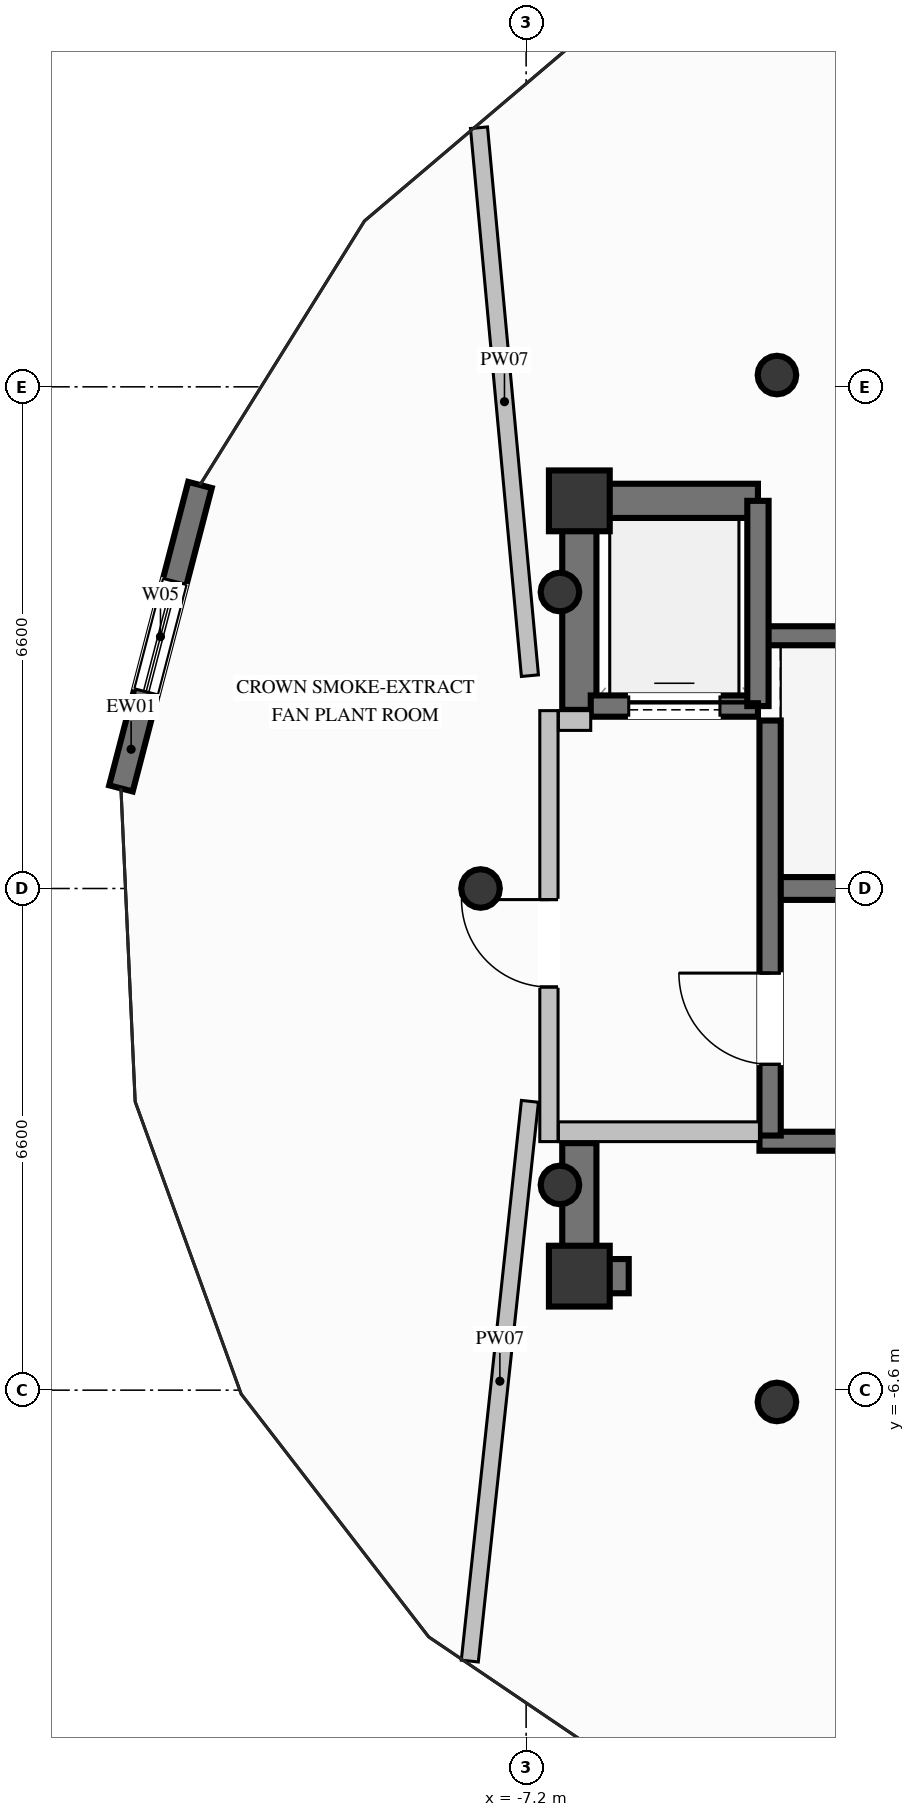
"""IFC4 building model, lengths in metres.
Left out: names, types, materials, properties, quantities, classifications, styles, units other than length and angle.
Written with IfcOpenShell. Run it as: python <this file> out.ifc"""

import sys

from ifc_helpers import new_model, si_unit, direction, frame, frame_2d, origin, origin_2d, place, context, subcontext, project, spatial, rectangle, hollow_circle, extrude, element, fill, save


model = new_model("IFC4")
c1 = context("Model", 3, precision=1e-05, world=origin(), true_north=direction((0.0, 1.0)))
c2 = subcontext(c1, "Body", "Model", "MODEL_VIEW")
j1 = project(units=[si_unit("LENGTHUNIT", "METRE"), si_unit("PLANEANGLEUNIT", "RADIAN")], contexts=[c1])
p1 = place(None, origin())
s1 = spatial("IfcSite", under=j1, at=p1, CompositionType="ELEMENT")
p2 = place(p1, origin())
s2 = spatial("IfcBuilding", under=s1, at=p2, CompositionType="ELEMENT")
p3 = place(p2, frame((0.0, 0.0, 308.2)))
s3 = spatial("IfcBuildingStorey", under=s2, at=p3, CompositionType="ELEMENT", Elevation=308.2)
for number, where, z_axis, x_axis in (
    (1, (-6.5, -5.1, 0.0), (0.0, 0.0, 1.0), (1.0, 0.0, 0.0)),
    (2, (-6.5, 5.1, 0.0), (0.0, 0.0, 1.0), (1.0, 0.0, 0.0)),
):
    element("IfcColumn", number, at=place(p3, frame(where, z_axis=z_axis, x_axis=x_axis)), inside=s3, PredefinedType="COLUMN", context=c2, shape_type="SweptSolid", body=[
        extrude(rectangle(XDim=0.8, YDim=0.8, at=origin_2d()), origin(), (0.0, 0.0, 1.0), 6.4),
    ])
p4 = place(p3, frame((-3.99, 0.0, 0.0), z_axis=(0.0, 0.0, 1.0), x_axis=(1.0, 0.0, 0.0)))
e3 = element("IfcWall", 3, at=p4, inside=s3, PredefinedType="SHEAR", context=c2, shape_type="SweptSolid", body=[
    extrude(rectangle(XDim=7.98, YDim=0.3, at=frame_2d((3.99, 0.0))), origin(), (0.0, 0.0, 1.0), 6.4),
])
for number, where, z_axis, x_axis in (
    (4, (-4.13, -3.325, 0.0), (0.0, 0.0, 1.0), (1.0, 0.0, 0.0)),
    (5, (-4.13, 3.325, 0.0), (0.0, 0.0, 1.0), (1.0, 0.0, 0.0)),
):
    element("IfcWall", number, at=place(p3, frame(where, z_axis=z_axis, x_axis=x_axis)), inside=s3, PredefinedType="SOLIDWALL", context=c2, shape_type="SweptSolid", body=[
        extrude(rectangle(XDim=8.26, YDim=0.25, at=frame_2d((4.13, 0.0))), origin(), (0.0, 0.0, 1.0), 6.4),
    ])
p5 = place(p3, frame((-6.275, -5.1, 0.0), z_axis=(0.0, 0.0, 1.0), x_axis=(1.0, 0.0, 0.0)))
e6 = element("IfcWall", 6, at=p5, inside=s3, PredefinedType="SHEAR", context=c2, shape_type="SweptSolid", body=[
    extrude(rectangle(XDim=0.425, YDim=0.45, at=frame_2d((0.212, 0.0))), origin(), (0.0, 0.0, 1.0), 6.4),
])
p6 = place(p3, frame((-6.275, 5.1, 0.0), z_axis=(0.0, 0.0, 1.0), x_axis=(1.0, 0.0, 0.0)))
e7 = element("IfcWall", 7, at=p6, inside=s3, PredefinedType="SHEAR", context=c2, shape_type="SweptSolid", body=[
    extrude(rectangle(XDim=2.125, YDim=0.45, at=frame_2d((1.062, 0.0))), origin(), (0.0, 0.0, 1.0), 6.4),
])
p7 = place(p3, frame((-6.5, 2.35, 0.0), z_axis=(0.0, 0.0, 1.0), x_axis=(0.0, 1.0, 0.0)))
e8 = element("IfcWall", 8, at=p7, inside=s3, PredefinedType="SHEAR", context=c2, shape_type="SweptSolid", body=[
    extrude(rectangle(XDim=2.975, YDim=0.45, at=frame_2d((1.487, 0.0))), origin(), (0.0, 0.0, 1.0), 6.4),
])
p8 = place(p3, frame((-6.5, -5.325, 0.0), z_axis=(0.0, 0.0, 1.0), x_axis=(0.0, 1.0, 0.0)))
e9 = element("IfcWall", 9, at=p8, inside=s3, PredefinedType="SHEAR", context=c2, shape_type="SweptSolid", body=[
    extrude(rectangle(XDim=1.975, YDim=0.45, at=frame_2d((0.987, 0.0))), origin(), (0.0, 0.0, 1.0), 6.4),
])
for number, where, z_axis, x_axis in (
    (10, (-3.9, 6.755, 0.0), (0.0, 0.0, 1.0), (1.0, 0.0, 0.0)),
    (11, (-6.755, 3.9, 0.0), (0.0, 0.0, 1.0), (1.0, 0.0, 0.0)),
    (12, (-7.8, 0.0, 0.0), (0.0, 0.0, 1.0), (1.0, 0.0, 0.0)),
    (13, (-6.755, -3.9, 0.0), (0.0, 0.0, 1.0), (1.0, 0.0, 0.0)),
    (14, (-3.9, -6.755, 0.0), (0.0, 0.0, 1.0), (1.0, 0.0, 0.0)),
):
    element("IfcColumn", number, at=place(p3, frame(where, z_axis=z_axis, x_axis=x_axis)), inside=s3, PredefinedType="COLUMN", context=c2, shape_type="SweptSolid", body=[
        extrude(hollow_circle(Radius=0.254, WallThickness=0.02, at=origin_2d()), origin(), (0.0, 0.0, 1.0), 6.4),
    ])
p9 = place(p3, frame((-12.531, 1.317, 0.0), z_axis=(0.0, 0.0, 1.0), x_axis=(0.252103886341, 0.967700175928, 0.0)))
e15 = element("IfcWall", 15, at=p9, inside=s3, PredefinedType="SOLIDWALL", context=c2, shape_type="SweptSolid", body=[
    extrude(rectangle(XDim=4.125, YDim=0.32, at=frame_2d((2.063, 0.0))), origin(), (0.0, 0.0, 1.0), 6.12),
])
p10 = place(p9, frame((1.313, 0.0, 1.1)))
e16 = element("IfcOpeningElement", 16, at=p10, cuts=e15, PredefinedType="OPENING", context=c2, shape_type="SweptSolid", body=[
    extrude(rectangle(XDim=1.5, YDim=1.2, at=frame_2d((0.75, 0.6))), frame((0.0, 0.17, 0.0), z_axis=(0.0, -1.0, 0.0), x_axis=(1.0, 0.0, 0.0)), (0.0, 0.0, 1.0), 0.34),
])
p11 = place(p3, frame((-6.35, 2.4, 0.0), z_axis=(0.0, 0.0, 1.0), x_axis=(1.0, 0.0, 0.0)))
e17 = element("IfcWall", 17, at=p11, inside=s3, PredefinedType="SOLIDWALL", context=c2, shape_type="SweptSolid", body=[
    extrude(rectangle(XDim=2.2, YDim=0.28, at=frame_2d((1.1, 0.0))), origin(), (0.0, 0.0, 1.0), 6.12),
])
p12 = place(p11, frame((0.5, 0.0, 0.0)))
e18 = element("IfcOpeningElement", 18, at=p12, cuts=e17, PredefinedType="OPENING", context=c2, shape_type="SweptSolid", body=[
    extrude(rectangle(XDim=1.2, YDim=2.2, at=frame_2d((0.6, 1.1))), frame((0.0, 0.15, 0.0), z_axis=(0.0, -1.0, 0.0), x_axis=(1.0, 0.0, 0.0)), (0.0, 0.0, 1.0), 0.3),
])
p13 = place(p3, frame((-4.15, 2.4, 0.0), z_axis=(0.0, 0.0, 1.0), x_axis=(0.0, 1.0, 0.0)))
e19 = element("IfcWall", 19, at=p13, inside=s3, PredefinedType="SOLIDWALL", context=c2, shape_type="SweptSolid", body=[
    extrude(rectangle(XDim=2.7, YDim=0.28, at=frame_2d((1.35, 0.0))), origin(), (0.0, 0.0, 1.0), 6.12),
])
p14 = place(p3, frame((-3.99, -3.25, 0.0), z_axis=(0.0, 0.0, 1.0), x_axis=(0.0, 1.0, 0.0)))
e20 = element("IfcWall", 20, at=p14, inside=s3, PredefinedType="SOLIDWALL", context=c2, shape_type="SweptSolid", body=[
    extrude(rectangle(XDim=5.46, YDim=0.28, at=frame_2d((2.73, 0.0))), origin(), (0.0, 0.0, 1.0), 6.12),
])
p15 = place(p14, frame((0.937, 0.0, 0.0)))
e21 = element("IfcOpeningElement", 21, at=p15, cuts=e20, PredefinedType="OPENING", context=c2, shape_type="SweptSolid", body=[
    extrude(rectangle(XDim=1.2, YDim=2.2, at=frame_2d((0.6, 1.1))), frame((0.0, 0.15, 0.0), z_axis=(0.0, -1.0, 0.0), x_axis=(1.0, 0.0, 0.0)), (0.0, 0.0, 1.0), 0.3),
])
p16 = place(p3, frame((-6.9, -3.33, 0.0), z_axis=(0.0, 0.0, 1.0), x_axis=(0.0, 1.0, 0.0)))
e22 = element("IfcWall", 22, at=p16, inside=s3, PredefinedType="PARTITIONING", context=c2, shape_type="SweptSolid", body=[
    extrude(rectangle(XDim=5.67, YDim=0.24, at=frame_2d((2.835, 0.0))), origin(), (0.0, 0.0, 1.0), 5.005),
])
p17 = place(p16, frame((2.034, 0.0, 0.0)))
e23 = element("IfcOpeningElement", 23, at=p17, cuts=e22, PredefinedType="OPENING", context=c2, shape_type="SweptSolid", body=[
    extrude(rectangle(XDim=1.15, YDim=2.2, at=frame_2d((0.575, 1.1))), frame((0.0, 0.13, 0.0), z_axis=(0.0, -1.0, 0.0), x_axis=(1.0, 0.0, 0.0)), (0.0, 0.0, 1.0), 0.26),
])
p18 = place(p3, frame((-6.775, -3.2, 0.0), z_axis=(0.0, 0.0, 1.0), x_axis=(1.0, 0.0, 0.0)))
e24 = element("IfcWall", 24, at=p18, inside=s3, PredefinedType="PARTITIONING", context=c2, shape_type="SweptSolid", body=[
    extrude(rectangle(XDim=2.645, YDim=0.26, at=frame_2d((1.323, 0.0))), origin(), (0.0, 0.0, 1.0), 6.12),
])
p19 = place(p3, frame((-6.775, 2.21, 0.0), z_axis=(0.0, 0.0, 1.0), x_axis=(1.0, 0.0, 0.0)))
e25 = element("IfcWall", 25, at=p19, inside=s3, PredefinedType="PARTITIONING", context=c2, shape_type="SweptSolid", body=[
    extrude(rectangle(XDim=0.425, YDim=0.26, at=frame_2d((0.212, 0.0))), origin(), (0.0, 0.0, 1.0), 6.12),
])
p20 = place(p3, frame((-7.15, 2.8, 0.0), z_axis=(0.0, 0.0, 1.0), x_axis=(-0.092563503102, 0.995706783091, 0.0)))
e26 = element("IfcWall", 26, at=p20, inside=s3, PredefinedType="PARTITIONING", context=c2, shape_type="SweptSolid", body=[
    extrude(rectangle(XDim=7.24, YDim=0.225, at=frame_2d((3.62, 0.0))), origin(), (0.0, 0.0, 1.0), 5.005),
])
p21 = place(p3, frame((-7.15, -2.8, 0.0), z_axis=(0.0, 0.0, 1.0), x_axis=(-0.106801982795, -0.994280310813, 0.0)))
e27 = element("IfcWall", 27, at=p21, inside=s3, PredefinedType="PARTITIONING", context=c2, shape_type="SweptSolid", body=[
    extrude(rectangle(XDim=7.406, YDim=0.225, at=frame_2d((3.703, 0.0))), origin(), (0.0, 0.0, 1.0), 5.005),
])
p22 = place(p10, origin())
e28 = element("IfcWindow", 28, at=p22, inside=s3, PartitioningType="SINGLE_PANEL", PredefinedType="WINDOW", context=c2, shape_type="SweptSolid", body=[
    extrude(rectangle(XDim=1.5, YDim=1.2, at=frame_2d((0.75, 0.6))), frame((0.0, 0.03, 0.0), z_axis=(0.0, -1.0, 0.0), x_axis=(1.0, 0.0, 0.0)), (0.0, 0.0, 1.0), 0.06),
])
fill(e16, e28)
p23 = place(p12, origin())
e29 = element("IfcDoor", 29, at=p23, inside=s3, OperationType="SLIDING_TO_LEFT", PredefinedType="DOOR", context=c2, shape_type="SweptSolid", body=[
    extrude(rectangle(XDim=1.2, YDim=2.2, at=frame_2d((0.6, 1.1))), frame((0.0, 0.025, 0.0), z_axis=(0.0, -1.0, 0.0), x_axis=(1.0, 0.0, 0.0)), (0.0, 0.0, 1.0), 0.05),
])
fill(e18, e29)
p24 = place(p15, origin())
e30 = element("IfcDoor", 30, at=p24, inside=s3, OperationType="SINGLE_SWING_RIGHT", PredefinedType="DOOR", context=c2, shape_type="SweptSolid", body=[
    extrude(rectangle(XDim=1.2, YDim=2.2, at=frame_2d((0.6, 1.1))), frame((0.0, 0.025, 0.0), z_axis=(0.0, -1.0, 0.0), x_axis=(1.0, 0.0, 0.0)), (0.0, 0.0, 1.0), 0.05),
])
fill(e21, e30)
p25 = place(p17, origin())
e31 = element("IfcDoor", 31, at=p25, inside=s3, OperationType="SINGLE_SWING_RIGHT", PredefinedType="DOOR", context=c2, shape_type="SweptSolid", body=[
    extrude(rectangle(XDim=1.15, YDim=2.2, at=frame_2d((0.575, 1.1))), frame((0.0, 0.025, 0.0), z_axis=(0.0, -1.0, 0.0), x_axis=(1.0, 0.0, 0.0)), (0.0, 0.0, 1.0), 0.05),
])
fill(e23, e31)
save(model, sys.argv[1])
